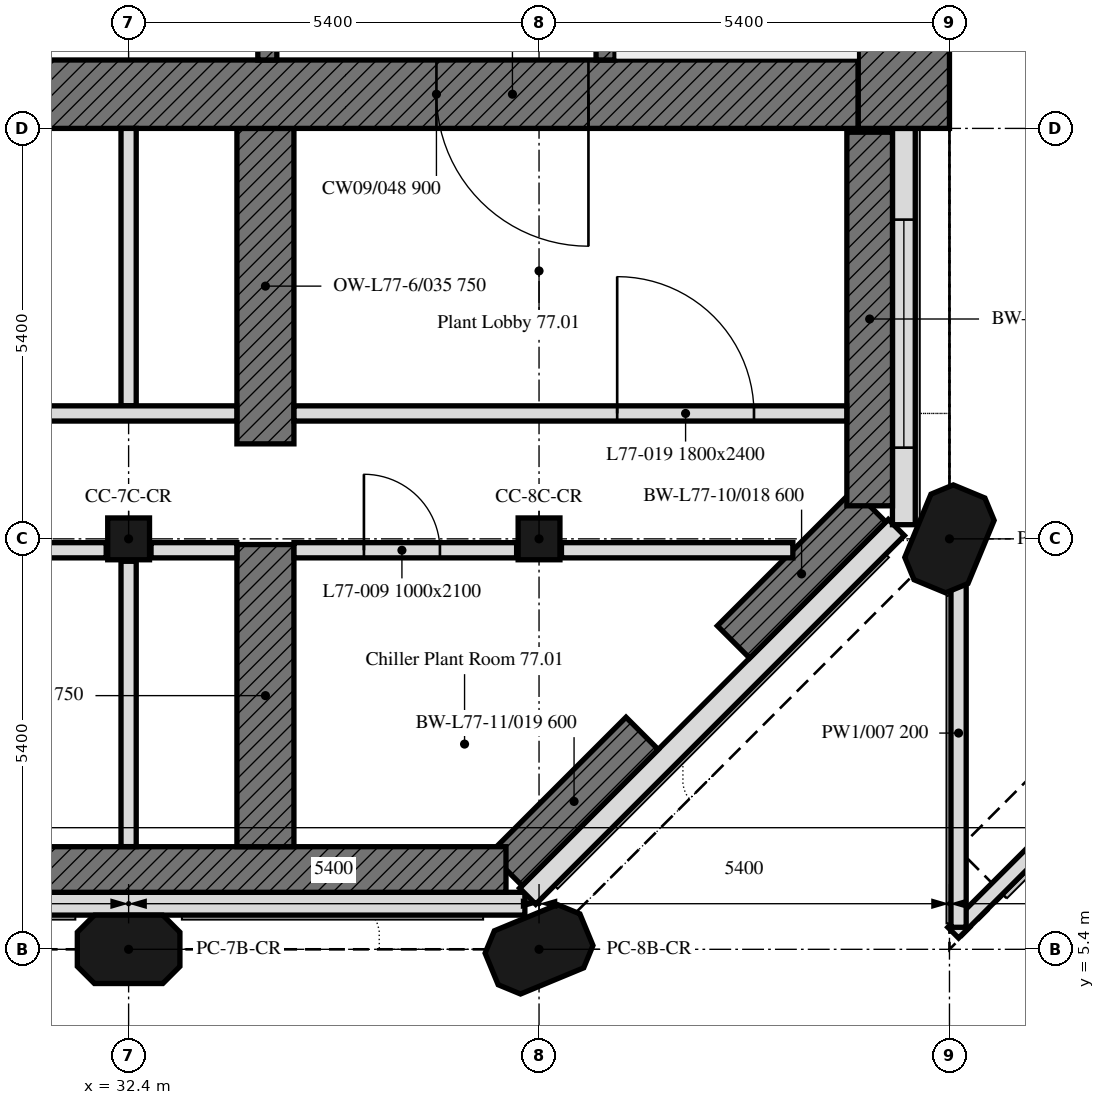
"""IFC4 building model, lengths in metres.
Left out: names, types, materials, properties, quantities, classifications, styles, units other than length and angle.
Written with IfcOpenShell. Run it as: python <this file> out.ifc"""

import sys

from ifc_helpers import new_model, si_unit, direction, frame, frame_2d, origin, origin_2d, place, context, subcontext, project, spatial, polyline, rectangle, outline, extrude, element, fill, save


model = new_model("IFC4")
c1 = context("Model", 3, precision=1e-05, world=origin(), true_north=direction((0.0, 1.0)))
c2 = subcontext(c1, "Body", "Model", "MODEL_VIEW")
j1 = project(units=[si_unit("LENGTHUNIT", "METRE"), si_unit("PLANEANGLEUNIT", "RADIAN")], contexts=[c1])
p1 = place(None, origin())
s1 = spatial("IfcSite", under=j1, at=p1, CompositionType="ELEMENT")
p2 = place(p1, origin())
s2 = spatial("IfcBuilding", under=s1, at=p2, CompositionType="ELEMENT")
p3 = place(p2, frame((0.0, 0.0, 308.2)))
s3 = spatial("IfcBuildingStorey", under=s2, at=p3, CompositionType="ELEMENT", Elevation=308.2)
for number, where, z_axis, x_axis in (
    (1, (32.4, 5.4, 0.0), (0.0, 0.0, 1.0), (1.0, 0.0, 0.0)),
    (2, (37.8, 5.4, 0.0), (0.0, 0.0, 1.0), (0.924, 0.383, 0.0)),
):
    element("IfcColumn", number, at=place(p3, frame(where, z_axis=z_axis, x_axis=x_axis)), inside=s3, PredefinedType="COLUMN", context=c2, shape_type="SweptSolid", body=[
        extrude(outline(polyline([(-0.45, -0.45), (0.45, -0.45), (0.675, -0.225), (0.675, 0.225), (0.45, 0.45), (-0.45, 0.45), (-0.675, 0.225), (-0.675, -0.225), (-0.45, -0.45)])), origin(), (0.0, 0.0, 1.0), 4.2),
    ])
for number, where, z_axis, x_axis in (
    (3, (32.4, 10.8, 0.0), (0.0, 0.0, 1.0), (1.0, 0.0, 0.0)),
    (4, (37.8, 10.8, 0.0), (0.0, 0.0, 1.0), (1.0, 0.0, 0.0)),
):
    element("IfcColumn", number, at=place(p3, frame(where, z_axis=z_axis, x_axis=x_axis)), inside=s3, PredefinedType="COLUMN", context=c2, shape_type="SweptSolid", body=[
        extrude(rectangle(XDim=0.55, YDim=0.55, at=origin_2d()), origin(), (0.0, 0.0, 1.0), 4.2),
    ])
p4 = place(p3, frame((43.2, 10.8, 0.0), z_axis=(0.0, 0.0, 1.0), x_axis=(0.382683432365, 0.923879532511, 0.0)))
e5 = element("IfcColumn", 5, at=p4, inside=s3, PredefinedType="COLUMN", context=c2, shape_type="SweptSolid", body=[
    extrude(outline(polyline([(-0.45, -0.45), (0.45, -0.45), (0.675, -0.225), (0.675, 0.225), (0.45, 0.45), (-0.45, 0.45), (-0.675, 0.225), (-0.675, -0.225), (-0.45, -0.45)])), origin(), (0.0, 0.0, 1.0), 4.2),
])
p5 = place(p3, frame((42.15, 16.15, 0.0), z_axis=(0.0, 0.0, 1.0), x_axis=(0.0, -1.0, 0.0)))
e6 = element("IfcWall", 6, at=p5, inside=s3, PredefinedType="SHEAR", context=c2, shape_type="SweptSolid", body=[
    extrude(rectangle(XDim=4.915, YDim=0.6, at=frame_2d((2.458, 0.0))), origin(), (0.0, 0.0, 1.0), 4.2),
])
p6 = place(p3, frame((42.15, 11.235, 0.0), z_axis=(0.0, 0.0, 1.0), x_axis=(-0.707106781187, -0.707106781187, 0.0)))
e7 = element("IfcWall", 7, at=p6, inside=s3, PredefinedType="SHEAR", context=c2, shape_type="SweptSolid", body=[
    extrude(rectangle(XDim=2.533, YDim=0.6, at=frame_2d((1.267, 0.0))), origin(), (0.0, 0.0, 1.0), 4.2),
])
p7 = place(p3, frame((39.156, 8.241, 0.0), z_axis=(0.0, 0.0, 1.0), x_axis=(-0.707106781187, -0.707106781187, 0.0)))
e8 = element("IfcWall", 8, at=p7, inside=s3, PredefinedType="SHEAR", context=c2, shape_type="SweptSolid", body=[
    extrude(rectangle(XDim=2.533, YDim=0.6, at=frame_2d((1.267, 0.0))), origin(), (0.0, 0.0, 1.0), 4.2),
])
p8 = place(p3, frame((37.365, 6.45, 0.0), z_axis=(0.0, 0.0, 1.0), x_axis=(-1.0, 0.0, 0.0)))
e9 = element("IfcWall", 9, at=p8, inside=s3, PredefinedType="SHEAR", context=c2, shape_type="SweptSolid", body=[
    extrude(rectangle(XDim=14.607, YDim=0.6, at=frame_2d((7.304, 0.0))), origin(), (0.0, 0.0, 1.0), 4.2),
])
p9 = place(p3, frame((34.2, 6.75, 0.0), z_axis=(0.0, 0.0, 1.0), x_axis=(0.0, 1.0, 0.0)))
e10 = element("IfcWall", 10, at=p9, inside=s3, PredefinedType="SHEAR", context=c2, shape_type="SweptSolid", body=[
    extrude(rectangle(XDim=3.975, YDim=0.75, at=frame_2d((1.988, 0.0))), origin(), (0.0, 0.0, 1.0), 4.2),
])
p10 = place(p3, frame((34.2, 12.05, 0.0), z_axis=(0.0, 0.0, 1.0), x_axis=(0.0, 1.0, 0.0)))
e11 = element("IfcWall", 11, at=p10, inside=s3, PredefinedType="SHEAR", context=c2, shape_type="SweptSolid", body=[
    extrude(rectangle(XDim=4.15, YDim=0.75, at=frame_2d((2.075, 0.0))), origin(), (0.0, 0.0, 1.0), 4.2),
])
p11 = place(p3, frame((5.586, 6.0, 0.0), z_axis=(0.0, 0.0, 1.0), x_axis=(1.0, 0.0, 0.0)))
e12 = element("IfcWall", 12, at=p11, inside=s3, PredefinedType="SOLIDWALL", context=c2, shape_type="SweptSolid", body=[
    extrude(outline(polyline([(0.0, 0.0), (32.027, 0.0), (32.027, 4.2), (31.434, 4.2), (30.841, 4.2), (30.248, 4.2), (29.655, 4.2), (29.062, 4.2), (28.469, 4.2), (27.875, 4.2), (27.282, 4.2), (26.689, 4.2), (26.096, 4.2), (25.503, 4.2), (24.91, 4.2), (24.317, 4.2), (23.724, 4.2), (23.131, 4.2), (22.538, 4.2), (21.945, 4.2), (21.352, 4.2), (20.758, 4.2), (20.165, 4.2), (19.572, 4.2), (18.979, 4.2), (18.386, 4.2), (17.793, 4.2), (17.2, 4.2), (16.607, 4.2), (16.014, 4.2), (15.42, 4.2), (14.827, 4.2), (14.234, 4.2), (13.641, 4.2), (13.048, 4.2), (12.455, 4.2), (11.862, 4.2), (11.269, 4.2), (10.676, 4.2), (10.083, 4.2), (9.49, 4.2), (8.896, 4.2), (8.303, 4.2), (7.71, 4.2), (7.117, 4.2), (6.524, 4.2), (5.931, 4.2), (5.338, 4.2), (4.745, 4.2), (4.152, 4.2), (3.559, 4.2), (2.966, 4.2), (2.372, 4.2), (1.779, 4.2), (1.186, 4.2), (0.593, 4.2), (0.0, 4.2), (0.0, 0.0)])), frame((0.0, 0.15, 0.0), z_axis=(0.0, -1.0, 0.0), x_axis=(1.0, 0.0, 0.0)), (0.0, 0.0, 1.0), 0.3),
])
p12 = place(p11, frame((1.014, 0.0, 0.6)))
e13 = element("IfcOpeningElement", 13, at=p12, cuts=e12, PredefinedType="OPENING", context=c2, shape_type="SweptSolid", body=[
    extrude(rectangle(XDim=3.0, YDim=1.8, at=frame_2d((1.5, 0.9))), frame((0.0, 0.16, 0.0), z_axis=(0.0, -1.0, 0.0), x_axis=(1.0, 0.0, 0.0)), (0.0, 0.0, 1.0), 0.32),
])
p13 = place(p3, frame((37.65, 6.099, 0.0), z_axis=(0.0, 0.0, 1.0), x_axis=(0.707106781187, 0.707106781187, 0.0)))
e14 = element("IfcWall", 14, at=p13, inside=s3, PredefinedType="SOLIDWALL", context=c2, shape_type="SweptSolid", body=[
    extrude(outline(polyline([(0.0, 0.0), (6.86, 0.0), (6.86, 4.2), (6.288, 4.2), (5.716, 4.2), (5.145, 4.2), (4.573, 4.2), (4.001, 4.2), (3.43, 4.2), (2.858, 4.2), (2.287, 4.2), (1.715, 4.2), (1.143, 4.2), (0.572, 4.2), (0.0, 4.2), (0.0, 0.0)])), frame((0.0, 0.15, 0.0), z_axis=(0.0, -1.0, 0.0), x_axis=(1.0, 0.0, 0.0)), (0.0, 0.0, 1.0), 0.3),
])
p14 = place(p3, frame((42.6, 10.986, 0.0), z_axis=(0.0, 0.0, 1.0), x_axis=(0.0, 1.0, 0.0)))
e15 = element("IfcWall", 15, at=p14, inside=s3, PredefinedType="SOLIDWALL", context=c2, shape_type="SweptSolid", body=[
    extrude(outline(polyline([(0.0, 0.0), (5.214, 0.0), (5.214, 4.2), (4.634, 4.2), (4.055, 4.2), (3.476, 4.2), (2.896, 4.2), (2.317, 4.2), (1.738, 4.2), (1.159, 4.2), (0.579, 4.2), (0.0, 4.2), (0.0, 0.0)])), frame((0.0, 0.15, 0.0), z_axis=(0.0, -1.0, 0.0), x_axis=(1.0, 0.0, 0.0)), (0.0, 0.0, 1.0), 0.3),
])
p15 = place(p14, frame((1.014, 0.0, 0.6)))
e16 = element("IfcOpeningElement", 16, at=p15, cuts=e15, PredefinedType="OPENING", context=c2, shape_type="SweptSolid", body=[
    extrude(rectangle(XDim=3.0, YDim=1.8, at=frame_2d((1.5, 0.9))), frame((0.0, 0.16, 0.0), z_axis=(0.0, -1.0, 0.0), x_axis=(1.0, 0.0, 0.0)), (0.0, 0.0, 1.0), 0.32),
])
p16 = place(p3, frame((48.48, 10.85, 0.0), z_axis=(0.0, 0.0, 1.0), x_axis=(-0.707106781187, -0.707106781187, 0.0)))
e17 = element("IfcWall", 17, at=p16, inside=s3, PredefinedType="PARAPET", context=c2, shape_type="SweptSolid", body=[
    extrude(rectangle(XDim=7.397, YDim=0.2, at=frame_2d((3.699, 0.0))), origin(), (0.0, 0.0, 1.0), 1.1),
])
p17 = place(p3, frame((43.32, 5.69, 0.0), z_axis=(0.0, 0.0, 1.0), x_axis=(0.0, 1.0, 0.0)))
e18 = element("IfcWall", 18, at=p17, inside=s3, PredefinedType="PARAPET", context=c2, shape_type="SweptSolid", body=[
    extrude(rectangle(XDim=5.11, YDim=0.2, at=frame_2d((2.555, 0.0))), origin(), (0.0, 0.0, 1.0), 1.1),
])
p18 = place(p3, frame((42.0, 16.65, 0.0), z_axis=(0.0, 0.0, 1.0), x_axis=(-1.0, 0.0, 0.0)))
e19 = element("IfcWall", 19, at=p18, inside=s3, PredefinedType="SOLIDWALL", context=c2, shape_type="SweptSolid", body=[
    extrude(rectangle(XDim=11.1, YDim=0.9, at=frame_2d((5.55, 0.0))), origin(), (0.0, 0.0, 1.0), 4.2),
])
p19 = place(p18, frame((3.55, 0.0, 0.0)))
e20 = element("IfcOpeningElement", 20, at=p19, cuts=e19, PredefinedType="OPENING", context=c2, shape_type="SweptSolid", body=[
    extrude(rectangle(XDim=2.0, YDim=2.4, at=frame_2d((1.0, 1.2))), frame((0.0, 0.45, 0.0), z_axis=(0.0, -1.0, 0.0), x_axis=(1.0, 0.0, 0.0)), (0.0, 0.0, 1.0), 0.9),
])
p20 = place(p3, frame((42.6, 32.4, 0.0), z_axis=(0.0, 0.0, 1.0), x_axis=(0.0, -1.0, 0.0)))
e21 = element("IfcWall", 21, at=p20, inside=s3, PredefinedType="SOLIDWALL", context=c2, shape_type="SweptSolid", body=[
    extrude(rectangle(XDim=16.2, YDim=1.2, at=frame_2d((8.1, 0.0))), origin(), (0.0, 0.0, 1.0), 4.2),
])
p21 = place(p3, frame((38.675, 17.1, 0.0), z_axis=(0.0, 0.0, 1.0), x_axis=(0.0, 1.0, 0.0)))
e22 = element("IfcWall", 22, at=p21, inside=s3, PredefinedType="SOLIDWALL", context=c2, shape_type="SweptSolid", body=[
    extrude(rectangle(XDim=14.4, YDim=0.25, at=frame_2d((7.2, 0.0))), origin(), (0.0, 0.0, 1.0), 4.2),
])
p22 = place(p21, frame((4.6, 0.0, 0.0)))
e23 = element("IfcOpeningElement", 23, at=p22, cuts=e22, PredefinedType="OPENING", context=c2, shape_type="SweptSolid", body=[
    extrude(rectangle(XDim=1.0, YDim=2.1, at=frame_2d((0.5, 1.05))), frame((0.0, 0.125, 0.0), z_axis=(0.0, -1.0, 0.0), x_axis=(1.0, 0.0, 0.0)), (0.0, 0.0, 1.0), 0.25),
])
p23 = place(p21, frame((7.062, 0.0, 0.0)))
e24 = element("IfcOpeningElement", 24, at=p23, cuts=e22, PredefinedType="OPENING", context=c2, shape_type="SweptSolid", body=[
    extrude(rectangle(XDim=1.2, YDim=2.1, at=frame_2d((0.6, 1.05))), frame((0.0, 0.125, 0.0), z_axis=(0.0, -1.0, 0.0), x_axis=(1.0, 0.0, 0.0)), (0.0, 0.0, 1.0), 0.25),
])
p24 = place(p21, frame((9.726, 0.0, 0.0)))
e25 = element("IfcOpeningElement", 25, at=p24, cuts=e22, PredefinedType="OPENING", context=c2, shape_type="SweptSolid", body=[
    extrude(rectangle(XDim=0.9, YDim=2.1, at=frame_2d((0.45, 1.05))), frame((0.0, 0.125, 0.0), z_axis=(0.0, -1.0, 0.0), x_axis=(1.0, 0.0, 0.0)), (0.0, 0.0, 1.0), 0.25),
])
p25 = place(p21, frame((11.539, 0.0, 0.0)))
e26 = element("IfcOpeningElement", 26, at=p25, cuts=e22, PredefinedType="OPENING", context=c2, shape_type="SweptSolid", body=[
    extrude(rectangle(XDim=0.9, YDim=2.1, at=frame_2d((0.45, 1.05))), frame((0.0, 0.125, 0.0), z_axis=(0.0, -1.0, 0.0), x_axis=(1.0, 0.0, 0.0)), (0.0, 0.0, 1.0), 0.25),
])
p26 = place(p21, frame((13.226, 0.0, 0.0)))
e27 = element("IfcOpeningElement", 27, at=p26, cuts=e22, PredefinedType="OPENING", context=c2, shape_type="SweptSolid", body=[
    extrude(rectangle(XDim=0.9, YDim=2.1, at=frame_2d((0.45, 1.05))), frame((0.0, 0.125, 0.0), z_axis=(0.0, -1.0, 0.0), x_axis=(1.0, 0.0, 0.0)), (0.0, 0.0, 1.0), 0.25),
])
p27 = place(p3, frame((34.225, 17.1, 0.0), z_axis=(0.0, 0.0, 1.0), x_axis=(0.0, 1.0, 0.0)))
e28 = element("IfcWall", 28, at=p27, inside=s3, PredefinedType="SOLIDWALL", context=c2, shape_type="SweptSolid", body=[
    extrude(rectangle(XDim=14.4, YDim=0.25, at=frame_2d((7.2, 0.0))), origin(), (0.0, 0.0, 1.0), 4.2),
])
p28 = place(p27, frame((13.15, 0.0, 0.0)))
e29 = element("IfcOpeningElement", 29, at=p28, cuts=e28, PredefinedType="OPENING", context=c2, shape_type="SweptSolid", body=[
    extrude(rectangle(XDim=1.0, YDim=2.1, at=frame_2d((0.5, 1.05))), frame((0.0, 0.125, 0.0), z_axis=(0.0, -1.0, 0.0), x_axis=(1.0, 0.0, 0.0)), (0.0, 0.0, 1.0), 0.25),
])
p29 = place(p27, frame((0.7, 0.0, 0.0)))
e30 = element("IfcOpeningElement", 30, at=p29, cuts=e28, PredefinedType="OPENING", context=c2, shape_type="SweptSolid", body=[
    extrude(rectangle(XDim=0.9, YDim=2.1, at=frame_2d((0.45, 1.05))), frame((0.0, 0.125, 0.0), z_axis=(0.0, -1.0, 0.0), x_axis=(1.0, 0.0, 0.0)), (0.0, 0.0, 1.0), 0.25),
])
p30 = place(p27, frame((6.175, 0.0, 0.0)))
e31 = element("IfcOpeningElement", 31, at=p30, cuts=e28, PredefinedType="OPENING", context=c2, shape_type="SweptSolid", body=[
    extrude(rectangle(XDim=0.9, YDim=2.1, at=frame_2d((0.45, 1.05))), frame((0.0, 0.125, 0.0), z_axis=(0.0, -1.0, 0.0), x_axis=(1.0, 0.0, 0.0)), (0.0, 0.0, 1.0), 0.25),
])
p31 = place(p3, frame((32.4, 6.751, 0.0), z_axis=(0.0, 0.0, 1.0), x_axis=(0.0, 1.0, 0.0)))
e32 = element("IfcWall", 32, at=p31, inside=s3, PredefinedType="PARTITIONING", context=c2, shape_type="SweptSolid", body=[
    extrude(rectangle(XDim=3.754, YDim=0.2, at=frame_2d((1.877, 0.0))), origin(), (0.0, 0.0, 1.0), 4.2),
])
p32 = place(p3, frame((32.695, 10.65, 0.0), z_axis=(0.0, 0.0, 1.0), x_axis=(1.0, 0.0, 0.0)))
e33 = element("IfcWall", 33, at=p32, inside=s3, PredefinedType="PARTITIONING", context=c2, shape_type="SweptSolid", body=[
    extrude(rectangle(XDim=1.129, YDim=0.2, at=frame_2d((0.564, 0.0))), origin(), (0.0, 0.0, 1.0), 4.2),
])
p33 = place(p3, frame((34.576, 10.65, 0.0), z_axis=(0.0, 0.0, 1.0), x_axis=(1.0, 0.0, 0.0)))
e34 = element("IfcWall", 34, at=p33, inside=s3, PredefinedType="PARTITIONING", context=c2, shape_type="SweptSolid", body=[
    extrude(rectangle(XDim=2.929, YDim=0.2, at=frame_2d((1.464, 0.0))), origin(), (0.0, 0.0, 1.0), 4.2),
])
p34 = place(p33, frame((0.92, 0.0, 0.0)))
e35 = element("IfcOpeningElement", 35, at=p34, cuts=e34, PredefinedType="OPENING", context=c2, shape_type="SweptSolid", body=[
    extrude(rectangle(XDim=1.0, YDim=2.1, at=frame_2d((0.5, 1.05))), frame((0.0, 0.1, 0.0), z_axis=(0.0, -1.0, 0.0), x_axis=(1.0, 0.0, 0.0)), (0.0, 0.0, 1.0), 0.2),
])
p35 = place(p3, frame((38.095, 10.65, 0.0), z_axis=(0.0, 0.0, 1.0), x_axis=(1.0, 0.0, 0.0)))
e36 = element("IfcWall", 36, at=p35, inside=s3, PredefinedType="PARTITIONING", context=c2, shape_type="SweptSolid", body=[
    extrude(rectangle(XDim=3.044, YDim=0.2, at=frame_2d((1.522, 0.0))), origin(), (0.0, 0.0, 1.0), 4.2),
])
p36 = place(p3, frame((27.295, 10.65, 0.0), z_axis=(0.0, 0.0, 1.0), x_axis=(1.0, 0.0, 0.0)))
e37 = element("IfcWall", 37, at=p36, inside=s3, PredefinedType="PARTITIONING", context=c2, shape_type="SweptSolid", body=[
    extrude(rectangle(XDim=4.81, YDim=0.2, at=frame_2d((2.405, 0.0))), origin(), (0.0, 0.0, 1.0), 4.2),
])
p37 = place(p36, frame((1.888, 0.0, 0.0)))
e38 = element("IfcOpeningElement", 38, at=p37, cuts=e37, PredefinedType="OPENING", context=c2, shape_type="SweptSolid", body=[
    extrude(rectangle(XDim=1.0, YDim=2.1, at=frame_2d((0.5, 1.05))), frame((0.0, 0.1, 0.0), z_axis=(0.0, -1.0, 0.0), x_axis=(1.0, 0.0, 0.0)), (0.0, 0.0, 1.0), 0.2),
])
p38 = place(p3, frame((32.4, 12.55, 0.0), z_axis=(0.0, 0.0, 1.0), x_axis=(0.0, 1.0, 0.0)))
e39 = element("IfcWall", 39, at=p38, inside=s3, PredefinedType="PARTITIONING", context=c2, shape_type="SweptSolid", body=[
    extrude(rectangle(XDim=3.65, YDim=0.2, at=frame_2d((1.825, 0.0))), origin(), (0.0, 0.0, 1.0), 4.2),
])
p39 = place(p3, frame((34.576, 12.45, 0.0), z_axis=(0.0, 0.0, 1.0), x_axis=(1.0, 0.0, 0.0)))
e40 = element("IfcWall", 40, at=p39, inside=s3, PredefinedType="PARTITIONING", context=c2, shape_type="SweptSolid", body=[
    extrude(rectangle(XDim=7.273, YDim=0.2, at=frame_2d((3.637, 0.0))), origin(), (0.0, 0.0, 1.0), 4.2),
])
p40 = place(p39, frame((4.252, 0.0, 0.0)))
e41 = element("IfcOpeningElement", 41, at=p40, cuts=e40, PredefinedType="OPENING", context=c2, shape_type="SweptSolid", body=[
    extrude(rectangle(XDim=1.8, YDim=2.4, at=frame_2d((0.9, 1.2))), frame((0.0, 0.1, 0.0), z_axis=(0.0, -1.0, 0.0), x_axis=(1.0, 0.0, 0.0)), (0.0, 0.0, 1.0), 0.2),
])
p41 = place(p3, frame((13.876, 12.45, 0.0), z_axis=(0.0, 0.0, 1.0), x_axis=(1.0, 0.0, 0.0)))
e42 = element("IfcWall", 42, at=p41, inside=s3, PredefinedType="PARTITIONING", context=c2, shape_type="SweptSolid", body=[
    extrude(rectangle(XDim=19.948, YDim=0.2, at=frame_2d((9.974, 0.0))), origin(), (0.0, 0.0, 1.0), 4.2),
])
p42 = place(p41, frame((15.324, 0.0, 0.0)))
e43 = element("IfcOpeningElement", 43, at=p42, cuts=e42, PredefinedType="OPENING", context=c2, shape_type="SweptSolid", body=[
    extrude(rectangle(XDim=1.0, YDim=2.1, at=frame_2d((0.5, 1.05))), frame((0.0, 0.1, 0.0), z_axis=(0.0, -1.0, 0.0), x_axis=(1.0, 0.0, 0.0)), (0.0, 0.0, 1.0), 0.2),
])
p43 = place(p41, frame((9.924, 0.0, 0.0)))
e44 = element("IfcOpeningElement", 44, at=p43, cuts=e42, PredefinedType="OPENING", context=c2, shape_type="SweptSolid", body=[
    extrude(rectangle(XDim=1.0, YDim=2.1, at=frame_2d((0.5, 1.05))), frame((0.0, 0.1, 0.0), z_axis=(0.0, -1.0, 0.0), x_axis=(1.0, 0.0, 0.0)), (0.0, 0.0, 1.0), 0.2),
])
p44 = place(p41, frame((4.624, 0.0, 0.0)))
e45 = element("IfcOpeningElement", 45, at=p44, cuts=e42, PredefinedType="OPENING", context=c2, shape_type="SweptSolid", body=[
    extrude(rectangle(XDim=0.8, YDim=2.1, at=frame_2d((0.4, 1.05))), frame((0.0, 0.1, 0.0), z_axis=(0.0, -1.0, 0.0), x_axis=(1.0, 0.0, 0.0)), (0.0, 0.0, 1.0), 0.2),
])
p45 = place(p15, origin())
e46 = element("IfcWindow", 46, at=p45, inside=s3, PartitioningType="SINGLE_PANEL", PredefinedType="WINDOW", context=c2, shape_type="SweptSolid", body=[
    extrude(rectangle(XDim=3.0, YDim=1.8, at=frame_2d((1.5, 0.9))), frame((0.0, 0.03, 0.0), z_axis=(0.0, -1.0, 0.0), x_axis=(1.0, 0.0, 0.0)), (0.0, 0.0, 1.0), 0.06),
])
fill(e16, e46)
p46 = place(p19, origin())
e47 = element("IfcDoor", 47, at=p46, inside=s3, OperationType="DOUBLE_DOOR_SINGLE_SWING", PredefinedType="DOOR", context=c2, shape_type="SweptSolid", body=[
    extrude(rectangle(XDim=2.0, YDim=2.4, at=frame_2d((1.0, 1.2))), frame((0.0, 0.025, 0.0), z_axis=(0.0, -1.0, 0.0), x_axis=(1.0, 0.0, 0.0)), (0.0, 0.0, 1.0), 0.05),
])
fill(e20, e47)
p47 = place(p34, origin())
e48 = element("IfcDoor", 48, at=p47, inside=s3, OperationType="SINGLE_SWING_RIGHT", PredefinedType="DOOR", context=c2, shape_type="SweptSolid", body=[
    extrude(rectangle(XDim=1.0, YDim=2.1, at=frame_2d((0.5, 1.05))), frame((0.0, 0.025, 0.0), z_axis=(0.0, -1.0, 0.0), x_axis=(1.0, 0.0, 0.0)), (0.0, 0.0, 1.0), 0.05),
])
fill(e35, e48)
p48 = place(p40, origin())
e49 = element("IfcDoor", 49, at=p48, inside=s3, OperationType="DOUBLE_DOOR_SINGLE_SWING", PredefinedType="DOOR", context=c2, shape_type="SweptSolid", body=[
    extrude(rectangle(XDim=1.8, YDim=2.4, at=frame_2d((0.9, 1.2))), frame((0.0, 0.025, 0.0), z_axis=(0.0, -1.0, 0.0), x_axis=(1.0, 0.0, 0.0)), (0.0, 0.0, 1.0), 0.05),
])
fill(e41, e49)
save(model, sys.argv[1])
